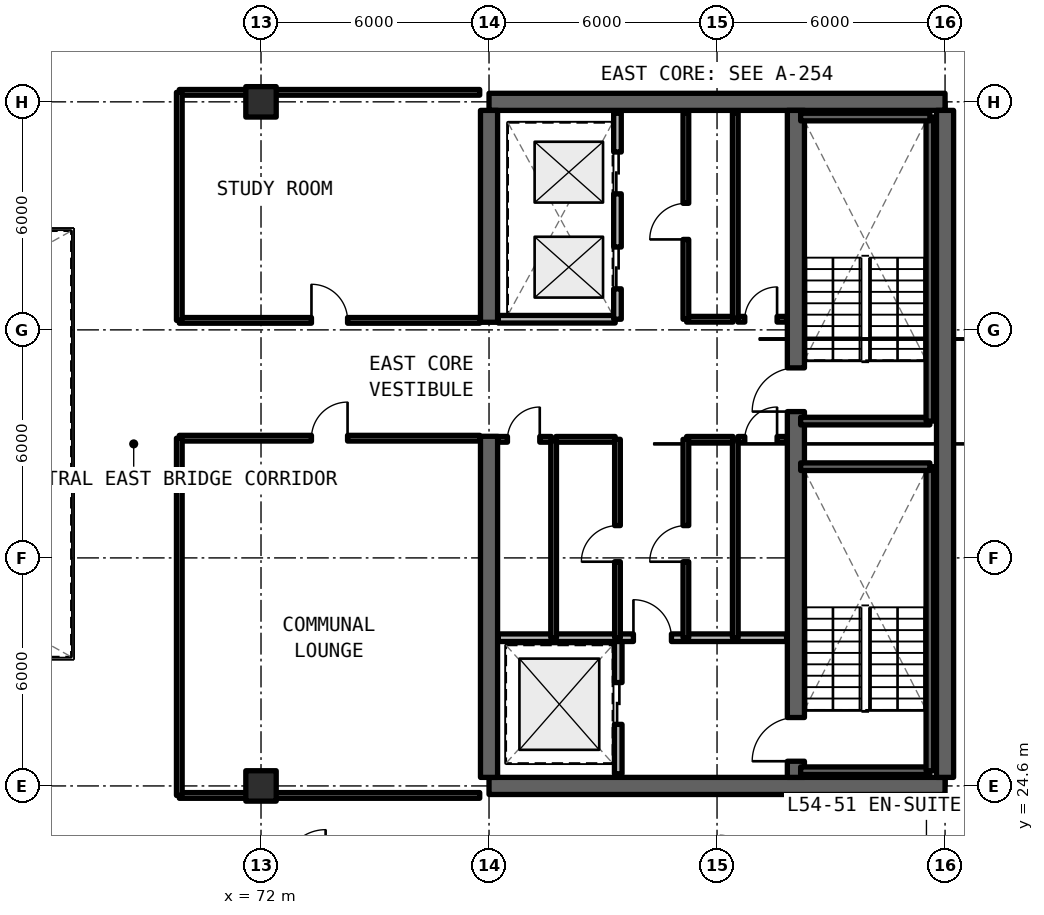
"""IFC4 building model, lengths in metres.
Left out: names, types, materials, properties, quantities, classifications, styles, units other than length and angle.
Written with IfcOpenShell. Run it as: python <this file> out.ifc"""

import sys

from ifc_helpers import new_model, si_unit, direction, frame, frame_2d, origin, origin_2d, place, context, subcontext, project, spatial, rectangle, extrude, element, fill, save


model = new_model("IFC4")
c1 = context("Model", 3, precision=1e-05, world=origin(), true_north=direction((0.0, 1.0)))
c2 = subcontext(c1, "Body", "Model", "MODEL_VIEW")
j1 = project(units=[si_unit("LENGTHUNIT", "METRE"), si_unit("PLANEANGLEUNIT", "RADIAN")], contexts=[c1])
p1 = place(None, origin())
s1 = spatial("IfcSite", under=j1, at=p1, CompositionType="ELEMENT")
p2 = place(p1, origin())
s2 = spatial("IfcBuilding", under=s1, at=p2, CompositionType="ELEMENT")
p3 = place(p2, frame((0.0, 0.0, 195.03)))
s3 = spatial("IfcBuildingStorey", under=s2, at=p3, CompositionType="ELEMENT", Elevation=195.03)
for number, where, z_axis, x_axis in (
    (1, (78.0, 24.6, 0.0), (0.0, 0.0, 1.0), (1.0, 0.0, 0.0)),
    (2, (90.0, 42.6, 0.0), (0.0, 0.0, 1.0), (-1.0, 0.0, 0.0)),
):
    element("IfcWall", number, at=place(p3, frame(where, z_axis=z_axis, x_axis=x_axis)), inside=s3, PredefinedType="SHEAR", context=c2, shape_type="SweptSolid", body=[
        extrude(rectangle(XDim=12.0, YDim=0.45, at=frame_2d((6.0, 0.0))), origin(), (0.0, 0.0, 1.0), 3.3),
    ])
p4 = place(p3, frame((90.0, 24.825, 0.0), z_axis=(0.0, 0.0, 1.0), x_axis=(0.0, 1.0, 0.0)))
e3 = element("IfcWall", 3, at=p4, inside=s3, PredefinedType="SHEAR", context=c2, shape_type="SweptSolid", body=[
    extrude(rectangle(XDim=17.55, YDim=0.45, at=frame_2d((8.775, 0.0))), origin(), (0.0, 0.0, 1.0), 3.3),
])
p5 = place(p3, frame((78.0, 24.825, 0.0), z_axis=(0.0, 0.0, 1.0), x_axis=(0.0, 1.0, 0.0)))
e4 = element("IfcWall", 4, at=p5, inside=s3, PredefinedType="SHEAR", context=c2, shape_type="SweptSolid", body=[
    extrude(rectangle(XDim=8.975, YDim=0.45, at=frame_2d((4.488, 0.0))), origin(), (0.0, 0.0, 1.0), 3.3),
])
p6 = place(p3, frame((78.0, 36.8, 0.0), z_axis=(0.0, 0.0, 1.0), x_axis=(0.0, 1.0, 0.0)))
e5 = element("IfcWall", 5, at=p6, inside=s3, PredefinedType="SHEAR", context=c2, shape_type="SweptSolid", body=[
    extrude(rectangle(XDim=5.575, YDim=0.45, at=frame_2d((2.788, 0.0))), origin(), (0.0, 0.0, 1.0), 3.3),
])
p7 = place(p3, frame((86.075, 24.825, 0.0), z_axis=(0.0, 0.0, 1.0), x_axis=(0.0, 1.0, 0.0)))
e6 = element("IfcWall", 6, at=p7, inside=s3, PredefinedType="SHEAR", context=c2, shape_type="SweptSolid", body=[
    extrude(rectangle(XDim=17.55, YDim=0.45, at=frame_2d((8.775, 0.0))), origin(), (0.0, 0.0, 1.0), 3.3),
])
p8 = place(p7, frame((0.425, 0.0, 0.0)))
e7 = element("IfcOpeningElement", 7, at=p8, cuts=e6, PredefinedType="OPENING", context=c2, shape_type="SweptSolid", body=[
    extrude(rectangle(XDim=1.15, YDim=2.15, at=frame_2d((0.575, 1.075))), frame((0.0, 0.235, 0.0), z_axis=(0.0, -1.0, 0.0), x_axis=(1.0, 0.0, 0.0)), (0.0, 0.0, 1.0), 0.47),
])
p9 = place(p7, frame((9.625, 0.0, 0.0)))
e8 = element("IfcOpeningElement", 8, at=p9, cuts=e6, PredefinedType="OPENING", context=c2, shape_type="SweptSolid", body=[
    extrude(rectangle(XDim=1.15, YDim=2.15, at=frame_2d((0.575, 1.075))), frame((0.0, 0.235, 0.0), z_axis=(0.0, -1.0, 0.0), x_axis=(1.0, 0.0, 0.0)), (0.0, 0.0, 1.0), 0.47),
])
for number, where, z_axis, x_axis in (
    (9, (72.0, 24.6, 0.0), (0.0, 0.0, 1.0), (1.0, 0.0, 0.0)),
    (10, (72.0, 42.6, 0.0), (0.0, 0.0, 1.0), (1.0, 0.0, 0.0)),
):
    element("IfcColumn", number, at=place(p3, frame(where, z_axis=z_axis, x_axis=x_axis)), inside=s3, PredefinedType="COLUMN", context=c2, shape_type="SweptSolid", body=[
        extrude(rectangle(XDim=0.8, YDim=0.8, at=origin_2d()), origin(), (0.0, 0.0, 1.0), 3.3),
    ])
p10 = place(p3, frame((81.4, 24.92, 0.0), z_axis=(0.0, 0.0, 1.0), x_axis=(0.0, 1.0, 0.0)))
e11 = element("IfcWall", 11, at=p10, inside=s3, PredefinedType="SOLIDWALL", context=c2, shape_type="SweptSolid", body=[
    extrude(rectangle(XDim=3.58, YDim=0.2, at=frame_2d((1.79, 0.0))), origin(), (0.0, 0.0, 1.0), 2.35),
])
p11 = place(p10, frame((1.3, 0.0, 0.0)))
e12 = element("IfcOpeningElement", 12, at=p11, cuts=e11, PredefinedType="OPENING", context=c2, shape_type="SweptSolid", body=[
    extrude(rectangle(XDim=1.1, YDim=2.2, at=frame_2d((0.55, 1.1))), frame((0.0, 0.11, 0.0), z_axis=(0.0, -1.0, 0.0), x_axis=(1.0, 0.0, 0.0)), (0.0, 0.0, 1.0), 0.22),
])
p12 = place(p3, frame((78.245, 28.5, 0.0), z_axis=(0.0, 0.0, 1.0), x_axis=(1.0, 0.0, 0.0)))
e13 = element("IfcWall", 13, at=p12, inside=s3, PredefinedType="SOLIDWALL", context=c2, shape_type="SweptSolid", body=[
    extrude(rectangle(XDim=7.585, YDim=0.2, at=frame_2d((3.792, 0.0))), origin(), (0.0, 0.0, 1.0), 2.35),
])
p13 = place(p12, frame((3.555, 0.0, 0.0)))
e14 = element("IfcOpeningElement", 14, at=p13, cuts=e13, PredefinedType="OPENING", context=c2, shape_type="SweptSolid", body=[
    extrude(rectangle(XDim=1.0, YDim=2.15, at=frame_2d((0.5, 1.075))), frame((0.0, 0.11, 0.0), z_axis=(0.0, -1.0, 0.0), x_axis=(1.0, 0.0, 0.0)), (0.0, 0.0, 1.0), 0.22),
])
p14 = place(p3, frame((84.48, 28.5, 0.0), z_axis=(0.0, 0.0, 1.0), x_axis=(0.0, 1.0, 0.0)))
e15 = element("IfcWall", 15, at=p14, inside=s3, PredefinedType="SOLIDWALL", context=c2, shape_type="SweptSolid", body=[
    extrude(rectangle(XDim=5.22, YDim=0.15, at=frame_2d((2.61, 0.0))), origin(), (0.0, 0.0, 1.0), 2.35),
])
p15 = place(p3, frame((84.55, 33.72, 0.0), z_axis=(0.0, 0.0, 1.0), x_axis=(1.0, 0.0, 0.0)))
e16 = element("IfcWall", 16, at=p15, inside=s3, PredefinedType="SOLIDWALL", context=c2, shape_type="SweptSolid", body=[
    extrude(rectangle(XDim=1.28, YDim=0.15, at=frame_2d((0.64, 0.0))), origin(), (0.0, 0.0, 1.0), 2.35),
])
p16 = place(p15, frame((0.18, 0.0, 0.0)))
e17 = element("IfcOpeningElement", 17, at=p16, cuts=e16, PredefinedType="OPENING", context=c2, shape_type="SweptSolid", body=[
    extrude(rectangle(XDim=0.85, YDim=2.1, at=frame_2d((0.425, 1.05))), frame((0.0, 0.085, 0.0), z_axis=(0.0, -1.0, 0.0), x_axis=(1.0, 0.0, 0.0)), (0.0, 0.0, 1.0), 0.17),
])
p17 = place(p3, frame((83.2, 33.72, 0.0), z_axis=(0.0, 0.0, 1.0), x_axis=(1.0, 0.0, 0.0)))
e18 = element("IfcWall", 18, at=p17, inside=s3, PredefinedType="SOLIDWALL", context=c2, shape_type="SweptSolid", body=[
    extrude(rectangle(XDim=1.22, YDim=0.15, at=frame_2d((0.61, 0.0))), origin(), (0.0, 0.0, 1.0), 2.35),
])
p18 = place(p3, frame((83.18, 28.5, 0.0), z_axis=(0.0, 0.0, 1.0), x_axis=(0.0, 1.0, 0.0)))
e19 = element("IfcWall", 19, at=p18, inside=s3, PredefinedType="SOLIDWALL", context=c2, shape_type="SweptSolid", body=[
    extrude(rectangle(XDim=5.22, YDim=0.15, at=frame_2d((2.61, 0.0))), origin(), (0.0, 0.0, 1.0), 2.35),
])
p19 = place(p18, frame((2.0, 0.0, 0.0)))
e20 = element("IfcOpeningElement", 20, at=p19, cuts=e19, PredefinedType="OPENING", context=c2, shape_type="SweptSolid", body=[
    extrude(rectangle(XDim=0.95, YDim=2.15, at=frame_2d((0.475, 1.075))), frame((0.0, 0.085, 0.0), z_axis=(0.0, -1.0, 0.0), x_axis=(1.0, 0.0, 0.0)), (0.0, 0.0, 1.0), 0.17),
])
p20 = place(p3, frame((79.7, 28.5, 0.0), z_axis=(0.0, 0.0, 1.0), x_axis=(0.0, 1.0, 0.0)))
e21 = element("IfcWall", 21, at=p20, inside=s3, PredefinedType="SOLIDWALL", context=c2, shape_type="SweptSolid", body=[
    extrude(rectangle(XDim=5.22, YDim=0.15, at=frame_2d((2.61, 0.0))), origin(), (0.0, 0.0, 1.0), 2.35),
])
p21 = place(p3, frame((79.76, 33.72, 0.0), z_axis=(0.0, 0.0, 1.0), x_axis=(1.0, 0.0, 0.0)))
e22 = element("IfcWall", 22, at=p21, inside=s3, PredefinedType="SOLIDWALL", context=c2, shape_type="SweptSolid", body=[
    extrude(rectangle(XDim=1.56, YDim=0.15, at=frame_2d((0.78, 0.0))), origin(), (0.0, 0.0, 1.0), 2.35),
])
p22 = place(p3, frame((78.245, 33.72, 0.0), z_axis=(0.0, 0.0, 1.0), x_axis=(1.0, 0.0, 0.0)))
e23 = element("IfcWall", 23, at=p22, inside=s3, PredefinedType="SOLIDWALL", context=c2, shape_type="SweptSolid", body=[
    extrude(rectangle(XDim=1.395, YDim=0.15, at=frame_2d((0.697, 0.0))), origin(), (0.0, 0.0, 1.0), 2.35),
])
p23 = place(p22, frame((0.24, 0.0, 0.0)))
e24 = element("IfcOpeningElement", 24, at=p23, cuts=e23, PredefinedType="OPENING", context=c2, shape_type="SweptSolid", body=[
    extrude(rectangle(XDim=0.85, YDim=2.1, at=frame_2d((0.425, 1.05))), frame((0.0, 0.085, 0.0), z_axis=(0.0, -1.0, 0.0), x_axis=(1.0, 0.0, 0.0)), (0.0, 0.0, 1.0), 0.17),
])
p24 = place(p3, frame((81.38, 28.5, 0.0), z_axis=(0.0, 0.0, 1.0), x_axis=(0.0, 1.0, 0.0)))
e25 = element("IfcWall", 25, at=p24, inside=s3, PredefinedType="SOLIDWALL", context=c2, shape_type="SweptSolid", body=[
    extrude(rectangle(XDim=5.22, YDim=0.15, at=frame_2d((2.61, 0.0))), origin(), (0.0, 0.0, 1.0), 2.35),
])
p25 = place(p24, frame((2.0, 0.0, 0.0)))
e26 = element("IfcOpeningElement", 26, at=p25, cuts=e25, PredefinedType="OPENING", context=c2, shape_type="SweptSolid", body=[
    extrude(rectangle(XDim=0.95, YDim=2.15, at=frame_2d((0.475, 1.075))), frame((0.0, 0.085, 0.0), z_axis=(0.0, -1.0, 0.0), x_axis=(1.0, 0.0, 0.0)), (0.0, 0.0, 1.0), 0.17),
])
p26 = place(p3, frame((84.48, 36.88, 0.0), z_axis=(0.0, 0.0, 1.0), x_axis=(0.0, 1.0, 0.0)))
e27 = element("IfcWall", 27, at=p26, inside=s3, PredefinedType="SOLIDWALL", context=c2, shape_type="SweptSolid", body=[
    extrude(rectangle(XDim=5.42, YDim=0.15, at=frame_2d((2.71, 0.0))), origin(), (0.0, 0.0, 1.0), 2.35),
])
p27 = place(p3, frame((84.55, 36.88, 0.0), z_axis=(0.0, 0.0, 1.0), x_axis=(1.0, 0.0, 0.0)))
e28 = element("IfcWall", 28, at=p27, inside=s3, PredefinedType="SOLIDWALL", context=c2, shape_type="SweptSolid", body=[
    extrude(rectangle(XDim=1.28, YDim=0.15, at=frame_2d((0.64, 0.0))), origin(), (0.0, 0.0, 1.0), 2.35),
])
p28 = place(p27, frame((0.18, 0.0, 0.0)))
e29 = element("IfcOpeningElement", 29, at=p28, cuts=e28, PredefinedType="OPENING", context=c2, shape_type="SweptSolid", body=[
    extrude(rectangle(XDim=0.85, YDim=2.1, at=frame_2d((0.425, 1.05))), frame((0.0, 0.085, 0.0), z_axis=(0.0, -1.0, 0.0), x_axis=(1.0, 0.0, 0.0)), (0.0, 0.0, 1.0), 0.17),
])
p29 = place(p3, frame((83.2, 36.88, 0.0), z_axis=(0.0, 0.0, 1.0), x_axis=(1.0, 0.0, 0.0)))
e30 = element("IfcWall", 30, at=p29, inside=s3, PredefinedType="SOLIDWALL", context=c2, shape_type="SweptSolid", body=[
    extrude(rectangle(XDim=1.22, YDim=0.15, at=frame_2d((0.61, 0.0))), origin(), (0.0, 0.0, 1.0), 2.35),
])
p30 = place(p3, frame((83.18, 36.88, 0.0), z_axis=(0.0, 0.0, 1.0), x_axis=(0.0, 1.0, 0.0)))
e31 = element("IfcWall", 31, at=p30, inside=s3, PredefinedType="SOLIDWALL", context=c2, shape_type="SweptSolid", body=[
    extrude(rectangle(XDim=5.42, YDim=0.15, at=frame_2d((2.71, 0.0))), origin(), (0.0, 0.0, 1.0), 2.35),
])
p31 = place(p30, frame((2.1, 0.0, 0.0)))
e32 = element("IfcOpeningElement", 32, at=p31, cuts=e31, PredefinedType="OPENING", context=c2, shape_type="SweptSolid", body=[
    extrude(rectangle(XDim=0.95, YDim=2.15, at=frame_2d((0.475, 1.075))), frame((0.0, 0.085, 0.0), z_axis=(0.0, -1.0, 0.0), x_axis=(1.0, 0.0, 0.0)), (0.0, 0.0, 1.0), 0.17),
])
p32 = place(p3, frame((78.245, 36.88, 0.0), z_axis=(0.0, 0.0, 1.0), x_axis=(1.0, 0.0, 0.0)))
e33 = element("IfcWall", 33, at=p32, inside=s3, PredefinedType="SOLIDWALL", context=c2, shape_type="SweptSolid", body=[
    extrude(rectangle(XDim=3.075, YDim=0.2, at=frame_2d((1.538, 0.0))), origin(), (0.0, 0.0, 1.0), 2.35),
])
p33 = place(p3, frame((81.38, 36.88, 0.0), z_axis=(0.0, 0.0, 1.0), x_axis=(0.0, 1.0, 0.0)))
e34 = element("IfcWall", 34, at=p33, inside=s3, PredefinedType="SOLIDWALL", context=c2, shape_type="SweptSolid", body=[
    extrude(rectangle(XDim=5.42, YDim=0.2, at=frame_2d((2.71, 0.0))), origin(), (0.0, 0.0, 1.0), 2.35),
])
p34 = place(p33, frame((0.8, 0.0, 0.0)))
e35 = element("IfcOpeningElement", 35, at=p34, cuts=e34, PredefinedType="OPENING", context=c2, shape_type="SweptSolid", body=[
    extrude(rectangle(XDim=1.1, YDim=2.2, at=frame_2d((0.55, 1.1))), frame((0.0, 0.11, 0.0), z_axis=(0.0, -1.0, 0.0), x_axis=(1.0, 0.0, 0.0)), (0.0, 0.0, 1.0), 0.22),
])
p35 = place(p33, frame((3.3, 0.0, 0.0)))
e36 = element("IfcOpeningElement", 36, at=p35, cuts=e34, PredefinedType="OPENING", context=c2, shape_type="SweptSolid", body=[
    extrude(rectangle(XDim=1.1, YDim=2.2, at=frame_2d((0.55, 1.1))), frame((0.0, 0.11, 0.0), z_axis=(0.0, -1.0, 0.0), x_axis=(1.0, 0.0, 0.0)), (0.0, 0.0, 1.0), 0.22),
])
p36 = place(p3, frame((69.85, 24.35, 0.0), z_axis=(0.0, 0.0, 1.0), x_axis=(1.0, 0.0, 0.0)))
e37 = element("IfcWall", 37, at=p36, inside=s3, PredefinedType="SOLIDWALL", context=c2, shape_type="SweptSolid", body=[
    extrude(rectangle(XDim=7.905, YDim=0.15, at=frame_2d((3.952, 0.0))), origin(), (0.0, 0.0, 1.0), 2.35),
])
p37 = place(p3, frame((69.85, 33.75, 0.0), z_axis=(0.0, 0.0, 1.0), x_axis=(1.0, 0.0, 0.0)))
e38 = element("IfcWall", 38, at=p37, inside=s3, PredefinedType="SOLIDWALL", context=c2, shape_type="SweptSolid", body=[
    extrude(rectangle(XDim=7.905, YDim=0.15, at=frame_2d((3.952, 0.0))), origin(), (0.0, 0.0, 1.0), 2.35),
])
p38 = place(p37, frame((3.478, 0.0, 0.0)))
e39 = element("IfcOpeningElement", 39, at=p38, cuts=e38, PredefinedType="OPENING", context=c2, shape_type="SweptSolid", body=[
    extrude(rectangle(XDim=0.95, YDim=2.15, at=frame_2d((0.475, 1.075))), frame((0.0, 0.085, 0.0), z_axis=(0.0, -1.0, 0.0), x_axis=(1.0, 0.0, 0.0)), (0.0, 0.0, 1.0), 0.17),
])
p39 = place(p3, frame((69.85, 24.35, 0.0), z_axis=(0.0, 0.0, 1.0), x_axis=(0.0, 1.0, 0.0)))
e40 = element("IfcWall", 40, at=p39, inside=s3, PredefinedType="SOLIDWALL", context=c2, shape_type="SweptSolid", body=[
    extrude(rectangle(XDim=9.4, YDim=0.15, at=frame_2d((4.7, 0.0))), origin(), (0.0, 0.0, 1.0), 2.35),
])
p40 = place(p3, frame((69.85, 36.85, 0.0), z_axis=(0.0, 0.0, 1.0), x_axis=(1.0, 0.0, 0.0)))
e41 = element("IfcWall", 41, at=p40, inside=s3, PredefinedType="SOLIDWALL", context=c2, shape_type="SweptSolid", body=[
    extrude(rectangle(XDim=7.905, YDim=0.15, at=frame_2d((3.952, 0.0))), origin(), (0.0, 0.0, 1.0), 2.35),
])
p41 = place(p40, frame((3.478, 0.0, 0.0)))
e42 = element("IfcOpeningElement", 42, at=p41, cuts=e41, PredefinedType="OPENING", context=c2, shape_type="SweptSolid", body=[
    extrude(rectangle(XDim=0.95, YDim=2.15, at=frame_2d((0.475, 1.075))), frame((0.0, 0.085, 0.0), z_axis=(0.0, -1.0, 0.0), x_axis=(1.0, 0.0, 0.0)), (0.0, 0.0, 1.0), 0.17),
])
p42 = place(p3, frame((69.85, 42.85, 0.0), z_axis=(0.0, 0.0, 1.0), x_axis=(1.0, 0.0, 0.0)))
e43 = element("IfcWall", 43, at=p42, inside=s3, PredefinedType="SOLIDWALL", context=c2, shape_type="SweptSolid", body=[
    extrude(rectangle(XDim=7.905, YDim=0.15, at=frame_2d((3.952, 0.0))), origin(), (0.0, 0.0, 1.0), 2.35),
])
p43 = place(p3, frame((69.85, 36.85, 0.0), z_axis=(0.0, 0.0, 1.0), x_axis=(0.0, 1.0, 0.0)))
e44 = element("IfcWall", 44, at=p43, inside=s3, PredefinedType="SOLIDWALL", context=c2, shape_type="SweptSolid", body=[
    extrude(rectangle(XDim=6.0, YDim=0.15, at=frame_2d((3.0, 0.0))), origin(), (0.0, 0.0, 1.0), 2.35),
])
p44 = place(p3, frame((86.2, 25.0, 0.0), z_axis=(0.0, 0.0, 1.0), x_axis=(1.0, 0.0, 0.0)))
e45 = element("IfcWall", 45, at=p44, inside=s3, PredefinedType="SOLIDWALL", context=c2, shape_type="SweptSolid", body=[
    extrude(rectangle(XDim=3.4, YDim=0.2, at=frame_2d((1.7, 0.0))), origin(), (0.0, 0.0, 1.0), 3.3),
])
p45 = place(p3, frame((89.6, 25.0, 0.0), z_axis=(0.0, 0.0, 1.0), x_axis=(0.0, 1.0, 0.0)))
e46 = element("IfcWall", 46, at=p45, inside=s3, PredefinedType="SOLIDWALL", context=c2, shape_type="SweptSolid", body=[
    extrude(rectangle(XDim=8.0, YDim=0.2, at=frame_2d((4.0, 0.0))), origin(), (0.0, 0.0, 1.0), 3.3),
])
for number, where, z_axis, x_axis in (
    (47, (89.6, 33.0, 0.0), (0.0, 0.0, 1.0), (-1.0, 0.0, 0.0)),
    (48, (86.2, 34.2, 0.0), (0.0, 0.0, 1.0), (1.0, 0.0, 0.0)),
):
    element("IfcWall", number, at=place(p3, frame(where, z_axis=z_axis, x_axis=x_axis)), inside=s3, PredefinedType="SOLIDWALL", context=c2, shape_type="SweptSolid", body=[
        extrude(rectangle(XDim=3.4, YDim=0.2, at=frame_2d((1.7, 0.0))), origin(), (0.0, 0.0, 1.0), 3.3),
    ])
p46 = place(p3, frame((89.6, 34.2, 0.0), z_axis=(0.0, 0.0, 1.0), x_axis=(0.0, 1.0, 0.0)))
e49 = element("IfcWall", 49, at=p46, inside=s3, PredefinedType="SOLIDWALL", context=c2, shape_type="SweptSolid", body=[
    extrude(rectangle(XDim=8.0, YDim=0.2, at=frame_2d((4.0, 0.0))), origin(), (0.0, 0.0, 1.0), 3.3),
])
p47 = place(p3, frame((89.6, 42.2, 0.0), z_axis=(0.0, 0.0, 1.0), x_axis=(-1.0, 0.0, 0.0)))
e50 = element("IfcWall", 50, at=p47, inside=s3, PredefinedType="SOLIDWALL", context=c2, shape_type="SweptSolid", body=[
    extrude(rectangle(XDim=3.4, YDim=0.2, at=frame_2d((1.7, 0.0))), origin(), (0.0, 0.0, 1.0), 3.3),
])
p48 = place(p11, origin())
e51 = element("IfcDoor", 51, at=p48, inside=s3, OperationType="SLIDING_TO_LEFT", PredefinedType="DOOR", context=c2, shape_type="SweptSolid", body=[
    extrude(rectangle(XDim=1.1, YDim=2.2, at=frame_2d((0.55, 1.1))), frame((0.0, 0.025, 0.0), z_axis=(0.0, -1.0, 0.0), x_axis=(1.0, 0.0, 0.0)), (0.0, 0.0, 1.0), 0.05),
])
fill(e12, e51)
p49 = place(p13, origin())
e52 = element("IfcDoor", 52, at=p49, inside=s3, OperationType="SINGLE_SWING_LEFT", PredefinedType="DOOR", context=c2, shape_type="SweptSolid", body=[
    extrude(rectangle(XDim=1.0, YDim=2.15, at=frame_2d((0.5, 1.075))), frame((0.0, 0.025, 0.0), z_axis=(0.0, -1.0, 0.0), x_axis=(1.0, 0.0, 0.0)), (0.0, 0.0, 1.0), 0.05),
])
fill(e14, e52)
p50 = place(p16, origin())
e53 = element("IfcDoor", 53, at=p50, inside=s3, OperationType="SINGLE_SWING_RIGHT", PredefinedType="DOOR", context=c2, shape_type="SweptSolid", body=[
    extrude(rectangle(XDim=0.85, YDim=2.1, at=frame_2d((0.425, 1.05))), frame((0.0, 0.025, 0.0), z_axis=(0.0, -1.0, 0.0), x_axis=(1.0, 0.0, 0.0)), (0.0, 0.0, 1.0), 0.05),
])
fill(e17, e53)
p51 = place(p19, origin())
e54 = element("IfcDoor", 54, at=p51, inside=s3, OperationType="SINGLE_SWING_LEFT", PredefinedType="DOOR", context=c2, shape_type="SweptSolid", body=[
    extrude(rectangle(XDim=0.95, YDim=2.15, at=frame_2d((0.475, 1.075))), frame((0.0, 0.025, 0.0), z_axis=(0.0, -1.0, 0.0), x_axis=(1.0, 0.0, 0.0)), (0.0, 0.0, 1.0), 0.05),
])
fill(e20, e54)
p52 = place(p23, origin())
e55 = element("IfcDoor", 55, at=p52, inside=s3, OperationType="SINGLE_SWING_RIGHT", PredefinedType="DOOR", context=c2, shape_type="SweptSolid", body=[
    extrude(rectangle(XDim=0.85, YDim=2.1, at=frame_2d((0.425, 1.05))), frame((0.0, 0.025, 0.0), z_axis=(0.0, -1.0, 0.0), x_axis=(1.0, 0.0, 0.0)), (0.0, 0.0, 1.0), 0.05),
])
fill(e24, e55)
p53 = place(p25, origin())
e56 = element("IfcDoor", 56, at=p53, inside=s3, OperationType="SINGLE_SWING_LEFT", PredefinedType="DOOR", context=c2, shape_type="SweptSolid", body=[
    extrude(rectangle(XDim=0.95, YDim=2.15, at=frame_2d((0.475, 1.075))), frame((0.0, 0.025, 0.0), z_axis=(0.0, -1.0, 0.0), x_axis=(1.0, 0.0, 0.0)), (0.0, 0.0, 1.0), 0.05),
])
fill(e26, e56)
p54 = place(p28, origin())
e57 = element("IfcDoor", 57, at=p54, inside=s3, OperationType="SINGLE_SWING_RIGHT", PredefinedType="DOOR", context=c2, shape_type="SweptSolid", body=[
    extrude(rectangle(XDim=0.85, YDim=2.1, at=frame_2d((0.425, 1.05))), frame((0.0, 0.025, 0.0), z_axis=(0.0, -1.0, 0.0), x_axis=(1.0, 0.0, 0.0)), (0.0, 0.0, 1.0), 0.05),
])
fill(e29, e57)
p55 = place(p31, origin())
e58 = element("IfcDoor", 58, at=p55, inside=s3, OperationType="SINGLE_SWING_LEFT", PredefinedType="DOOR", context=c2, shape_type="SweptSolid", body=[
    extrude(rectangle(XDim=0.95, YDim=2.15, at=frame_2d((0.475, 1.075))), frame((0.0, 0.025, 0.0), z_axis=(0.0, -1.0, 0.0), x_axis=(1.0, 0.0, 0.0)), (0.0, 0.0, 1.0), 0.05),
])
fill(e32, e58)
p56 = place(p34, origin())
e59 = element("IfcDoor", 59, at=p56, inside=s3, OperationType="SLIDING_TO_LEFT", PredefinedType="DOOR", context=c2, shape_type="SweptSolid", body=[
    extrude(rectangle(XDim=1.1, YDim=2.2, at=frame_2d((0.55, 1.1))), frame((0.0, 0.025, 0.0), z_axis=(0.0, -1.0, 0.0), x_axis=(1.0, 0.0, 0.0)), (0.0, 0.0, 1.0), 0.05),
])
fill(e35, e59)
p57 = place(p35, origin())
e60 = element("IfcDoor", 60, at=p57, inside=s3, OperationType="SLIDING_TO_RIGHT", PredefinedType="DOOR", context=c2, shape_type="SweptSolid", body=[
    extrude(rectangle(XDim=1.1, YDim=2.2, at=frame_2d((0.55, 1.1))), frame((0.0, 0.025, 0.0), z_axis=(0.0, -1.0, 0.0), x_axis=(1.0, 0.0, 0.0)), (0.0, 0.0, 1.0), 0.05),
])
fill(e36, e60)
p58 = place(p38, origin())
e61 = element("IfcDoor", 61, at=p58, inside=s3, OperationType="SINGLE_SWING_RIGHT", PredefinedType="DOOR", context=c2, shape_type="SweptSolid", body=[
    extrude(rectangle(XDim=0.95, YDim=2.15, at=frame_2d((0.475, 1.075))), frame((0.0, 0.025, 0.0), z_axis=(0.0, -1.0, 0.0), x_axis=(1.0, 0.0, 0.0)), (0.0, 0.0, 1.0), 0.05),
])
fill(e39, e61)
p59 = place(p41, origin())
e62 = element("IfcDoor", 62, at=p59, inside=s3, OperationType="SINGLE_SWING_LEFT", PredefinedType="DOOR", context=c2, shape_type="SweptSolid", body=[
    extrude(rectangle(XDim=0.95, YDim=2.15, at=frame_2d((0.475, 1.075))), frame((0.0, 0.025, 0.0), z_axis=(0.0, -1.0, 0.0), x_axis=(1.0, 0.0, 0.0)), (0.0, 0.0, 1.0), 0.05),
])
fill(e42, e62)
p60 = place(p8, origin())
e63 = element("IfcDoor", 63, at=p60, inside=s3, OperationType="SINGLE_SWING_RIGHT", PredefinedType="DOOR", context=c2, shape_type="SweptSolid", body=[
    extrude(rectangle(XDim=1.15, YDim=2.15, at=frame_2d((0.575, 1.075))), frame((0.0, 0.025, 0.0), z_axis=(0.0, -1.0, 0.0), x_axis=(1.0, 0.0, 0.0)), (0.0, 0.0, 1.0), 0.05),
])
fill(e7, e63)
p61 = place(p9, origin())
e64 = element("IfcDoor", 64, at=p61, inside=s3, OperationType="SINGLE_SWING_LEFT", PredefinedType="DOOR", context=c2, shape_type="SweptSolid", body=[
    extrude(rectangle(XDim=1.15, YDim=2.15, at=frame_2d((0.575, 1.075))), frame((0.0, 0.025, 0.0), z_axis=(0.0, -1.0, 0.0), x_axis=(1.0, 0.0, 0.0)), (0.0, 0.0, 1.0), 0.05),
])
fill(e8, e64)
save(model, sys.argv[1])
